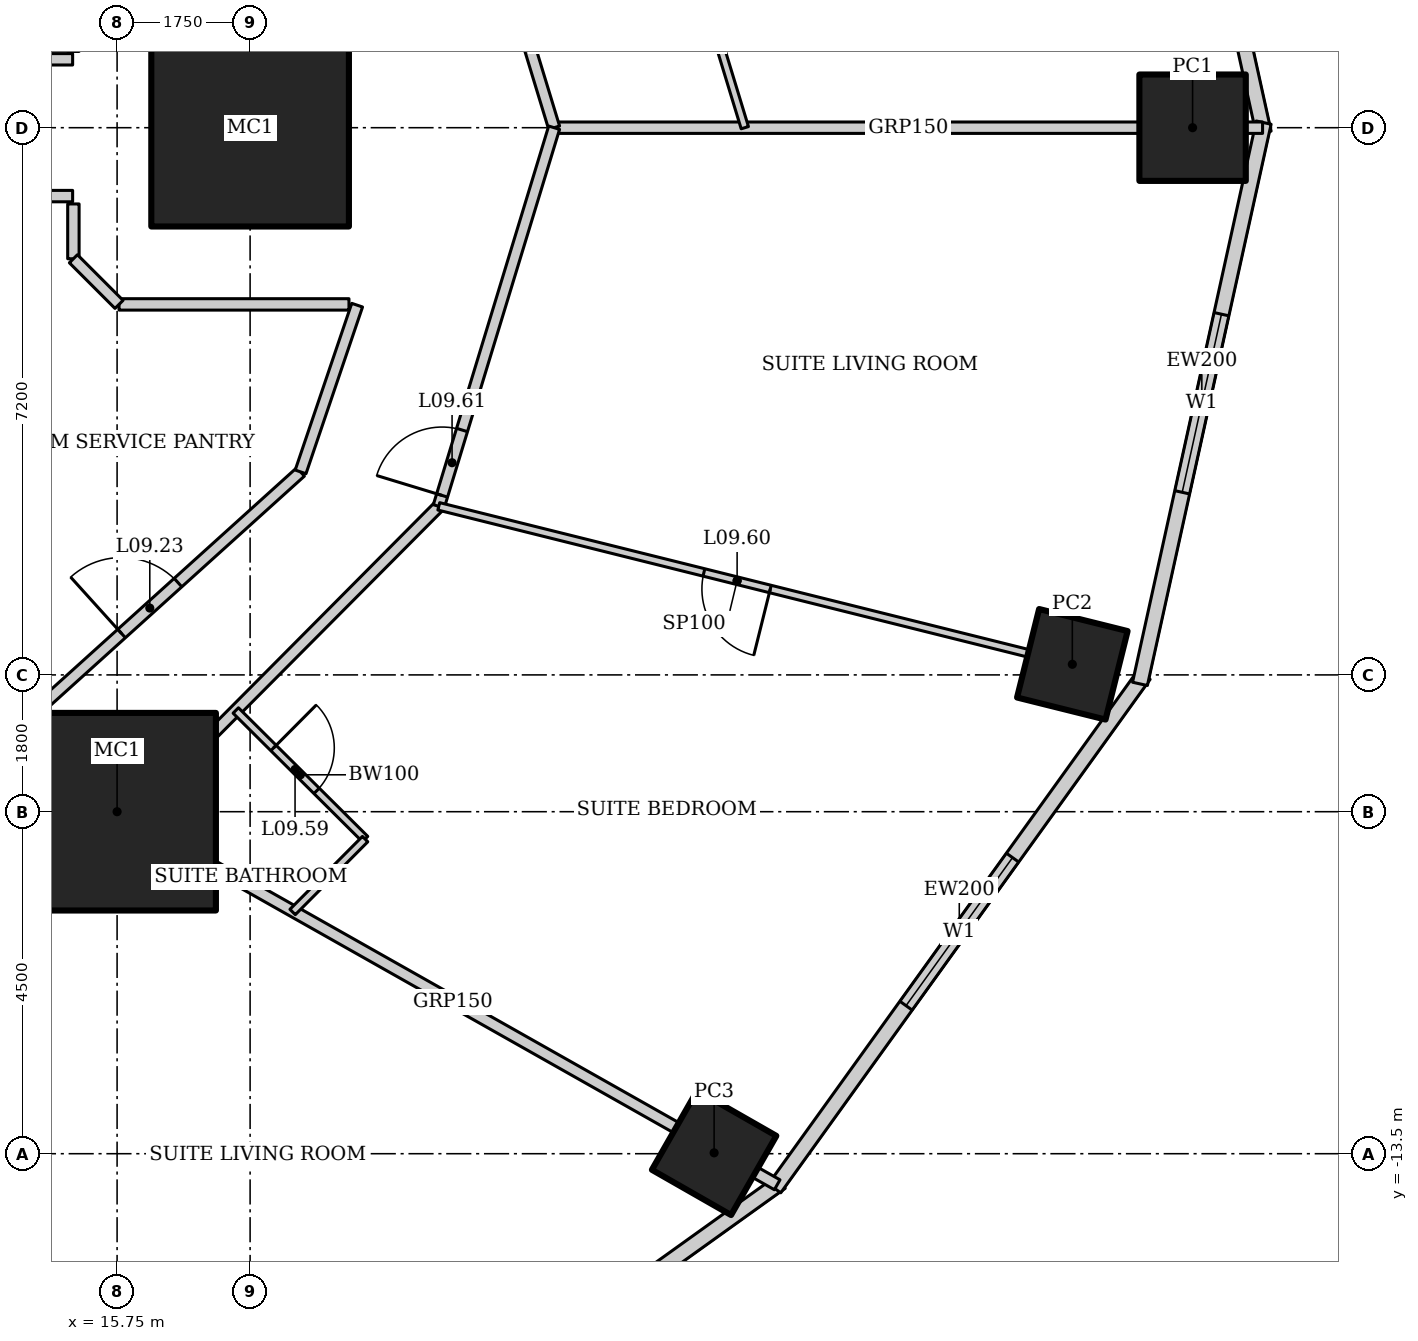
"""IFC4 building model, lengths in metres.
Left out: names, types, materials, properties, quantities, classifications, styles, units other than length and angle.
Written with IfcOpenShell. Run it as: python <this file> out.ifc"""

import sys

from ifc_helpers import new_model, si_unit, direction, frame, frame_2d, origin, origin_2d, place, context, subcontext, project, spatial, rectangle, hollow_rectangle, extrude, element, fill, save


model = new_model("IFC4")
c1 = context("Model", 3, precision=1e-05, world=origin(), true_north=direction((0.0, 1.0)))
c2 = subcontext(c1, "Body", "Model", "MODEL_VIEW")
j1 = project(units=[si_unit("LENGTHUNIT", "METRE"), si_unit("PLANEANGLEUNIT", "RADIAN")], contexts=[c1])
p1 = place(None, origin())
s1 = spatial("IfcSite", under=j1, at=p1, CompositionType="ELEMENT")
p2 = place(p1, origin())
s2 = spatial("IfcBuilding", under=s1, at=p2, CompositionType="ELEMENT")
p3 = place(p2, frame((0.0, 0.0, 47.8)))
s3 = spatial("IfcBuildingStorey", under=s2, at=p3, CompositionType="ELEMENT", Elevation=47.8)
for number, where, z_axis, x_axis in (
    (1, (17.5, 0.0, 0.0), (0.0, 0.0, 1.0), (1.0, 0.0, 0.0)),
    (2, (15.75, -9.0, 0.0), (0.0, 0.0, 1.0), (1.0, 0.0, 0.0)),
):
    element("IfcColumn", number, at=place(p3, frame(where, z_axis=z_axis, x_axis=x_axis)), inside=s3, PredefinedType="COLUMN", context=c2, shape_type="SweptSolid", body=[
        extrude(hollow_rectangle(XDim=2.6, YDim=2.6, WallThickness=0.13, at=origin_2d()), origin(), (0.0, 0.0, 1.0), 3.6),
    ])
p4 = place(p3, frame((29.9, 0.0, 0.0), z_axis=(0.0, 0.0, 1.0), x_axis=(1.0, 0.0, 0.0)))
e3 = element("IfcColumn", 3, at=p4, inside=s3, PredefinedType="COLUMN", context=c2, shape_type="SweptSolid", body=[
    extrude(hollow_rectangle(XDim=1.4, YDim=1.4, WallThickness=0.1, at=origin_2d()), origin(), (0.0, 0.0, 1.0), 3.6),
])
p5 = place(p3, frame((23.605, -13.489, 0.0), z_axis=(0.0, 0.0, 1.0), x_axis=(0.496139221777, 0.86824298017, 0.0)))
e4 = element("IfcColumn", 4, at=p5, inside=s3, PredefinedType="COLUMN", context=c2, shape_type="SweptSolid", body=[
    extrude(hollow_rectangle(XDim=1.2, YDim=1.2, WallThickness=0.12, at=origin_2d()), origin(), (0.0, 0.0, 1.0), 3.6),
])
p6 = place(p3, frame((28.318, -7.06, 0.0), z_axis=(0.0, 0.0, 1.0), x_axis=(0.2419218956, 0.970295726276, 0.0)))
e5 = element("IfcColumn", 5, at=p6, inside=s3, PredefinedType="COLUMN", context=c2, shape_type="SweptSolid", body=[
    extrude(hollow_rectangle(XDim=1.2, YDim=1.2, WallThickness=0.1, at=origin_2d()), origin(), (0.0, 0.0, 1.0), 3.6),
])
p7 = place(p3, frame((30.835, -0.067, 0.0), z_axis=(0.0, 0.0, 1.0), x_axis=(-0.215238065514, 0.976561608478, 0.0)))
e6 = element("IfcWall", 6, at=p7, inside=s3, PredefinedType="SOLIDWALL", context=c2, shape_type="SweptSolid", body=[
    extrude(rectangle(XDim=7.562, YDim=0.2, at=frame_2d((3.781, 0.0))), origin(), (0.0, 0.0, 1.0), 3.45),
])
p8 = place(p7, frame((2.581, 0.0, 0.5)))
e7 = element("IfcOpeningElement", 7, at=p8, cuts=e6, PredefinedType="OPENING", context=c2, shape_type="SweptSolid", body=[
    extrude(rectangle(XDim=2.4, YDim=2.2, at=frame_2d((1.2, 1.1))), frame((0.0, 0.11, 0.0), z_axis=(0.0, -1.0, 0.0), x_axis=(1.0, 0.0, 0.0)), (0.0, 0.0, 1.0), 0.22),
])
p9 = place(p3, frame((17.929, -18.572, 0.0), z_axis=(0.0, 0.0, 1.0), x_axis=(0.812791321576, 0.582554948112, 0.0)))
e8 = element("IfcWall", 8, at=p9, inside=s3, PredefinedType="SOLIDWALL", context=c2, shape_type="SweptSolid", body=[
    extrude(rectangle(XDim=8.063, YDim=0.2, at=frame_2d((4.032, 0.0))), origin(), (0.0, 0.0, 1.0), 3.45),
])
p10 = place(p9, frame((2.832, 0.0, 0.5)))
e9 = element("IfcOpeningElement", 9, at=p10, cuts=e8, PredefinedType="OPENING", context=c2, shape_type="SweptSolid", body=[
    extrude(rectangle(XDim=2.4, YDim=2.2, at=frame_2d((1.2, 1.1))), frame((0.0, 0.11, 0.0), z_axis=(0.0, -1.0, 0.0), x_axis=(1.0, 0.0, 0.0)), (0.0, 0.0, 1.0), 0.22),
])
p11 = place(p3, frame((24.4, -13.957, 0.0), z_axis=(0.0, 0.0, 1.0), x_axis=(0.583937613703, 0.811798536155, 0.0)))
e10 = element("IfcWall", 10, at=p11, inside=s3, PredefinedType="SOLIDWALL", context=c2, shape_type="SweptSolid", body=[
    extrude(rectangle(XDim=8.323, YDim=0.2, at=frame_2d((4.162, 0.0))), origin(), (0.0, 0.0, 1.0), 3.45),
])
p12 = place(p11, frame((2.961, 0.0, 0.5)))
e11 = element("IfcOpeningElement", 11, at=p12, cuts=e10, PredefinedType="OPENING", context=c2, shape_type="SweptSolid", body=[
    extrude(rectangle(XDim=2.4, YDim=2.2, at=frame_2d((1.2, 1.1))), frame((0.0, 0.11, 0.0), z_axis=(0.0, -1.0, 0.0), x_axis=(1.0, 0.0, 0.0)), (0.0, 0.0, 1.0), 0.22),
])
p13 = place(p3, frame((29.208, -7.318, 0.0), z_axis=(0.0, 0.0, 1.0), x_axis=(0.215238065514, 0.976561608478, 0.0)))
e12 = element("IfcWall", 12, at=p13, inside=s3, PredefinedType="SOLIDWALL", context=c2, shape_type="SweptSolid", body=[
    extrude(rectangle(XDim=7.562, YDim=0.2, at=frame_2d((3.781, 0.0))), origin(), (0.0, 0.0, 1.0), 3.45),
])
p14 = place(p13, frame((2.581, 0.0, 0.5)))
e13 = element("IfcOpeningElement", 13, at=p14, cuts=e12, PredefinedType="OPENING", context=c2, shape_type="SweptSolid", body=[
    extrude(rectangle(XDim=2.4, YDim=2.2, at=frame_2d((1.2, 1.1))), frame((0.0, 0.11, 0.0), z_axis=(0.0, -1.0, 0.0), x_axis=(1.0, 0.0, 0.0)), (0.0, 0.0, 1.0), 0.22),
])
p15 = place(p3, frame((30.821, 0.0, 0.0), z_axis=(0.0, 0.0, 1.0), x_axis=(-1.0, 0.0, 0.0)))
e14 = element("IfcWall", 14, at=p15, inside=s3, PredefinedType="PARTITIONING", context=c2, shape_type="SweptSolid", body=[
    extrude(rectangle(XDim=9.321, YDim=0.15, at=frame_2d((4.66, 0.0))), origin(), (0.0, 0.0, 1.0), 2.528),
])
p16 = place(p3, frame((24.435, -13.909, 0.0), z_axis=(0.0, 0.0, 1.0), x_axis=(-0.870612006791, 0.491970256856, 0.0)))
e15 = element("IfcWall", 15, at=p16, inside=s3, PredefinedType="PARTITIONING", context=c2, shape_type="SweptSolid", body=[
    extrude(rectangle(XDim=9.802, YDim=0.15, at=frame_2d((4.901, 0.0))), origin(), (0.0, 0.0, 1.0), 2.693),
])
p17 = place(p3, frame((21.5, 0.0, 0.0), z_axis=(0.0, 0.0, 1.0), x_axis=(-0.291383581394, 0.95660629754, 0.0)))
e16 = element("IfcWall", 16, at=p17, inside=s3, PredefinedType="PARTITIONING", context=c2, shape_type="SweptSolid", body=[
    extrude(rectangle(XDim=5.208, YDim=0.15, at=frame_2d((2.604, 0.0))), origin(), (0.0, 0.0, 1.0), 3.45),
])
p18 = place(p3, frame((11.147, -11.544, 0.0), z_axis=(0.0, 0.0, 1.0), x_axis=(0.888333171507, 0.459199495209, 0.0)))
e17 = element("IfcWall", 17, at=p18, inside=s3, PredefinedType="PARTITIONING", context=c2, shape_type="SweptSolid", body=[
    extrude(rectangle(XDim=5.351, YDim=0.15, at=frame_2d((2.676, 0.0))), origin(), (0.0, 0.0, 1.0), 3.45),
])
p19 = place(p18, frame((0.15, 0.0, 0.0)))
e18 = element("IfcOpeningElement", 18, at=p19, cuts=e17, PredefinedType="OPENING", context=c2, shape_type="SweptSolid", body=[
    extrude(rectangle(XDim=0.9, YDim=2.1, at=frame_2d((0.45, 1.05))), frame((0.0, 0.085, 0.0), z_axis=(0.0, -1.0, 0.0), x_axis=(1.0, 0.0, 0.0)), (0.0, 0.0, 1.0), 0.17),
])
p20 = place(p3, frame((15.901, -9.086, 0.0), z_axis=(0.0, 0.0, 1.0), x_axis=(0.705121546414, 0.709086457904, 0.0)))
e19 = element("IfcWall", 19, at=p20, inside=s3, PredefinedType="PARTITIONING", context=c2, shape_type="SweptSolid", body=[
    extrude(rectangle(XDim=5.788, YDim=0.15, at=frame_2d((2.894, 0.0))), origin(), (0.0, 0.0, 1.0), 3.45),
])
p21 = place(p3, frame((19.982, -4.982, 0.0), z_axis=(0.0, 0.0, 1.0), x_axis=(0.291383581394, 0.95660629754, 0.0)))
e20 = element("IfcWall", 20, at=p21, inside=s3, PredefinedType="PARTITIONING", context=c2, shape_type="SweptSolid", body=[
    extrude(rectangle(XDim=5.208, YDim=0.15, at=frame_2d((2.604, 0.0))), origin(), (0.0, 0.0, 1.0), 3.45),
])
p22 = place(p21, frame((0.15, 0.0, 0.0)))
e21 = element("IfcOpeningElement", 21, at=p22, cuts=e20, PredefinedType="OPENING", context=c2, shape_type="SweptSolid", body=[
    extrude(rectangle(XDim=0.9, YDim=2.1, at=frame_2d((0.45, 1.05))), frame((0.0, 0.085, 0.0), z_axis=(0.0, -1.0, 0.0), x_axis=(1.0, 0.0, 0.0)), (0.0, 0.0, 1.0), 0.17),
])
p23 = place(p3, frame((14.196, -8.112, 0.0), z_axis=(0.0, 0.0, 1.0), x_axis=(0.742194222, 0.670184852731, 0.0)))
e22 = element("IfcWall", 22, at=p23, inside=s3, PredefinedType="PARTITIONING", context=c2, shape_type="SweptSolid", body=[
    extrude(rectangle(XDim=5.347, YDim=0.15, at=frame_2d((2.673, 0.0))), origin(), (0.0, 0.0, 1.0), 3.45),
])
p24 = place(p23, frame((2.173, 0.0, 0.0)))
e23 = element("IfcOpeningElement", 23, at=p24, cuts=e22, PredefinedType="OPENING", context=c2, shape_type="SweptSolid", body=[
    extrude(rectangle(XDim=1.0, YDim=2.1, at=frame_2d((0.5, 1.05))), frame((0.0, 0.085, 0.0), z_axis=(0.0, -1.0, 0.0), x_axis=(1.0, 0.0, 0.0)), (0.0, 0.0, 1.0), 0.17),
])
p25 = place(p3, frame((23.213, 2.613, 0.0), z_axis=(0.0, 0.0, 1.0), x_axis=(0.291339473488, -0.956619731757, 0.0)))
e24 = element("IfcWall", 24, at=p25, inside=s3, PredefinedType="PARTITIONING", context=c2, shape_type="SweptSolid", body=[
    extrude(rectangle(XDim=2.731, YDim=0.1, at=frame_2d((1.365, 0.0))), origin(), (0.0, 0.0, 1.0), 3.45),
])
p26 = place(p3, frame((16.944, -17.545, 0.0), z_axis=(0.0, 0.0, 1.0), x_axis=(-0.694680670522, 0.71931826475, 0.0)))
e25 = element("IfcWall", 25, at=p26, inside=s3, PredefinedType="PARTITIONING", context=c2, shape_type="SweptSolid", body=[
    extrude(rectangle(XDim=8.344, YDim=0.1, at=frame_2d((4.172, 0.0))), origin(), (0.0, 0.0, 1.0), 2.528),
])
p27 = place(p26, frame((3.722, 0.0, 0.0)))
e26 = element("IfcOpeningElement", 26, at=p27, cuts=e25, PredefinedType="OPENING", context=c2, shape_type="SweptSolid", body=[
    extrude(rectangle(XDim=0.9, YDim=2.1, at=frame_2d((0.45, 1.05))), frame((0.0, 0.06, 0.0), z_axis=(0.0, -1.0, 0.0), x_axis=(1.0, 0.0, 0.0)), (0.0, 0.0, 1.0), 0.12),
])
p28 = place(p3, frame((17.311, -7.668, 0.0), z_axis=(0.0, 0.0, 1.0), x_axis=(0.709138392716, -0.705069315724, 0.0)))
e27 = element("IfcWall", 27, at=p28, inside=s3, PredefinedType="PARTITIONING", context=c2, shape_type="SweptSolid", body=[
    extrude(rectangle(XDim=2.4, YDim=0.1, at=frame_2d((1.2, 0.0))), origin(), (0.0, 0.0, 1.0), 3.45),
])
p29 = place(p28, frame((0.7, 0.0, 0.0)))
e28 = element("IfcOpeningElement", 28, at=p29, cuts=e27, PredefinedType="OPENING", context=c2, shape_type="SweptSolid", body=[
    extrude(rectangle(XDim=0.8, YDim=2.1, at=frame_2d((0.4, 1.05))), frame((0.0, 0.06, 0.0), z_axis=(0.0, -1.0, 0.0), x_axis=(1.0, 0.0, 0.0)), (0.0, 0.0, 1.0), 0.12),
])
p30 = place(p3, frame((19.013, -9.36, 0.0), z_axis=(0.0, 0.0, 1.0), x_axis=(-0.7051187611, -0.709089227633, 0.0)))
e29 = element("IfcWall", 29, at=p30, inside=s3, PredefinedType="PARTITIONING", context=c2, shape_type="SweptSolid", body=[
    extrude(rectangle(XDim=1.353, YDim=0.1, at=frame_2d((0.676, 0.0))), origin(), (0.0, 0.0, 1.0), 3.45),
])
p31 = place(p3, frame((27.833, -6.939, 0.0), z_axis=(0.0, 0.0, 1.0), x_axis=(-0.97029673161, 0.24191786339, 0.0)))
e30 = element("IfcWall", 30, at=p31, inside=s3, PredefinedType="PARTITIONING", context=c2, shape_type="SweptSolid", body=[
    extrude(rectangle(XDim=8.091, YDim=0.1, at=frame_2d((4.045, 0.0))), origin(), (0.0, 0.0, 1.0), 2.332),
])
p32 = place(p31, frame((3.595, 0.0, 0.0)))
e31 = element("IfcOpeningElement", 31, at=p32, cuts=e30, PredefinedType="OPENING", context=c2, shape_type="SweptSolid", body=[
    extrude(rectangle(XDim=0.9, YDim=2.1, at=frame_2d((0.45, 1.05))), frame((0.0, 0.06, 0.0), z_axis=(0.0, -1.0, 0.0), x_axis=(1.0, 0.0, 0.0)), (0.0, 0.0, 1.0), 0.12),
])
p33 = place(p3, frame((18.164, -4.529, 0.0), z_axis=(0.0, 0.0, 1.0), x_axis=(0.321124194945, 0.947037090837, 0.0)))
e32 = element("IfcWall", 32, at=p33, inside=s3, PredefinedType="PARTITIONING", context=c2, shape_type="SweptSolid", body=[
    extrude(rectangle(XDim=2.317, YDim=0.15, at=frame_2d((1.158, 0.0))), origin(), (0.0, 0.0, 1.0), 3.45),
])
for number, where, z_axis, x_axis in (
    (33, (14.2, -0.9, 0.0), (0.0, 0.0, 1.0), (1.0, 0.0, 0.0)),
    (34, (14.2, 0.9, 0.0), (0.0, 0.0, 1.0), (1.0, 0.0, 0.0)),
):
    element("IfcWall", number, at=place(p3, frame(where, z_axis=z_axis, x_axis=x_axis)), inside=s3, PredefinedType="PARTITIONING", context=c2, shape_type="SweptSolid", body=[
        extrude(rectangle(XDim=0.965, YDim=0.15, at=frame_2d((0.482, 0.0))), origin(), (0.0, 0.0, 1.0), 3.45),
    ])
p34 = place(p3, frame((15.175, -1.725, 0.0), z_axis=(0.0, 0.0, 1.0), x_axis=(0.0, 1.0, 0.0)))
e35 = element("IfcWall", 35, at=p34, inside=s3, PredefinedType="PARTITIONING", context=c2, shape_type="SweptSolid", body=[
    extrude(rectangle(XDim=0.721, YDim=0.15, at=frame_2d((0.361, 0.0))), origin(), (0.0, 0.0, 1.0), 3.45),
])
p35 = place(p3, frame((18.801, -2.325, 0.0), z_axis=(0.0, 0.0, 1.0), x_axis=(-1.0, 0.0, 0.0)))
e36 = element("IfcWall", 36, at=p35, inside=s3, PredefinedType="PARTITIONING", context=c2, shape_type="SweptSolid", body=[
    extrude(rectangle(XDim=3.025, YDim=0.15, at=frame_2d((1.513, 0.0))), origin(), (0.0, 0.0, 1.0), 3.45),
])
p36 = place(p3, frame((15.775, -2.325, 0.0), z_axis=(0.0, 0.0, 1.0), x_axis=(-0.707106781187, 0.707106781187, 0.0)))
e37 = element("IfcWall", 37, at=p36, inside=s3, PredefinedType="PARTITIONING", context=c2, shape_type="SweptSolid", body=[
    extrude(rectangle(XDim=0.849, YDim=0.15, at=frame_2d((0.425, 0.0))), origin(), (0.0, 0.0, 1.0), 3.45),
])
p37 = place(p12, origin())
e38 = element("IfcWindow", 38, at=p37, inside=s3, PartitioningType="SINGLE_PANEL", PredefinedType="WINDOW", context=c2, shape_type="SweptSolid", body=[
    extrude(rectangle(XDim=2.4, YDim=2.2, at=frame_2d((1.2, 1.1))), frame((0.0, 0.03, 0.0), z_axis=(0.0, -1.0, 0.0), x_axis=(1.0, 0.0, 0.0)), (0.0, 0.0, 1.0), 0.06),
])
fill(e11, e38)
p38 = place(p14, origin())
e39 = element("IfcWindow", 39, at=p38, inside=s3, PartitioningType="SINGLE_PANEL", PredefinedType="WINDOW", context=c2, shape_type="SweptSolid", body=[
    extrude(rectangle(XDim=2.4, YDim=2.2, at=frame_2d((1.2, 1.1))), frame((0.0, 0.03, 0.0), z_axis=(0.0, -1.0, 0.0), x_axis=(1.0, 0.0, 0.0)), (0.0, 0.0, 1.0), 0.06),
])
fill(e13, e39)
p39 = place(p24, origin())
e40 = element("IfcDoor", 40, at=p39, inside=s3, OperationType="SINGLE_SWING_LEFT", PredefinedType="DOOR", context=c2, shape_type="SweptSolid", body=[
    extrude(rectangle(XDim=1.0, YDim=2.1, at=frame_2d((0.5, 1.05))), frame((0.0, 0.025, 0.0), z_axis=(0.0, -1.0, 0.0), x_axis=(1.0, 0.0, 0.0)), (0.0, 0.0, 1.0), 0.05),
])
fill(e23, e40)
p40 = place(p29, origin())
e41 = element("IfcDoor", 41, at=p40, inside=s3, OperationType="SINGLE_SWING_LEFT", PredefinedType="DOOR", context=c2, shape_type="SweptSolid", body=[
    extrude(rectangle(XDim=0.8, YDim=2.1, at=frame_2d((0.4, 1.05))), frame((0.0, 0.025, 0.0), z_axis=(0.0, -1.0, 0.0), x_axis=(1.0, 0.0, 0.0)), (0.0, 0.0, 1.0), 0.05),
])
fill(e28, e41)
p41 = place(p32, origin())
e42 = element("IfcDoor", 42, at=p41, inside=s3, OperationType="SINGLE_SWING_LEFT", PredefinedType="DOOR", context=c2, shape_type="SweptSolid", body=[
    extrude(rectangle(XDim=0.9, YDim=2.1, at=frame_2d((0.45, 1.05))), frame((0.0, 0.025, 0.0), z_axis=(0.0, -1.0, 0.0), x_axis=(1.0, 0.0, 0.0)), (0.0, 0.0, 1.0), 0.05),
])
fill(e31, e42)
p42 = place(p22, origin())
e43 = element("IfcDoor", 43, at=p42, inside=s3, OperationType="SINGLE_SWING_LEFT", PredefinedType="DOOR", context=c2, shape_type="SweptSolid", body=[
    extrude(rectangle(XDim=0.9, YDim=2.1, at=frame_2d((0.45, 1.05))), frame((0.0, 0.025, 0.0), z_axis=(0.0, -1.0, 0.0), x_axis=(1.0, 0.0, 0.0)), (0.0, 0.0, 1.0), 0.05),
])
fill(e21, e43)
save(model, sys.argv[1])
